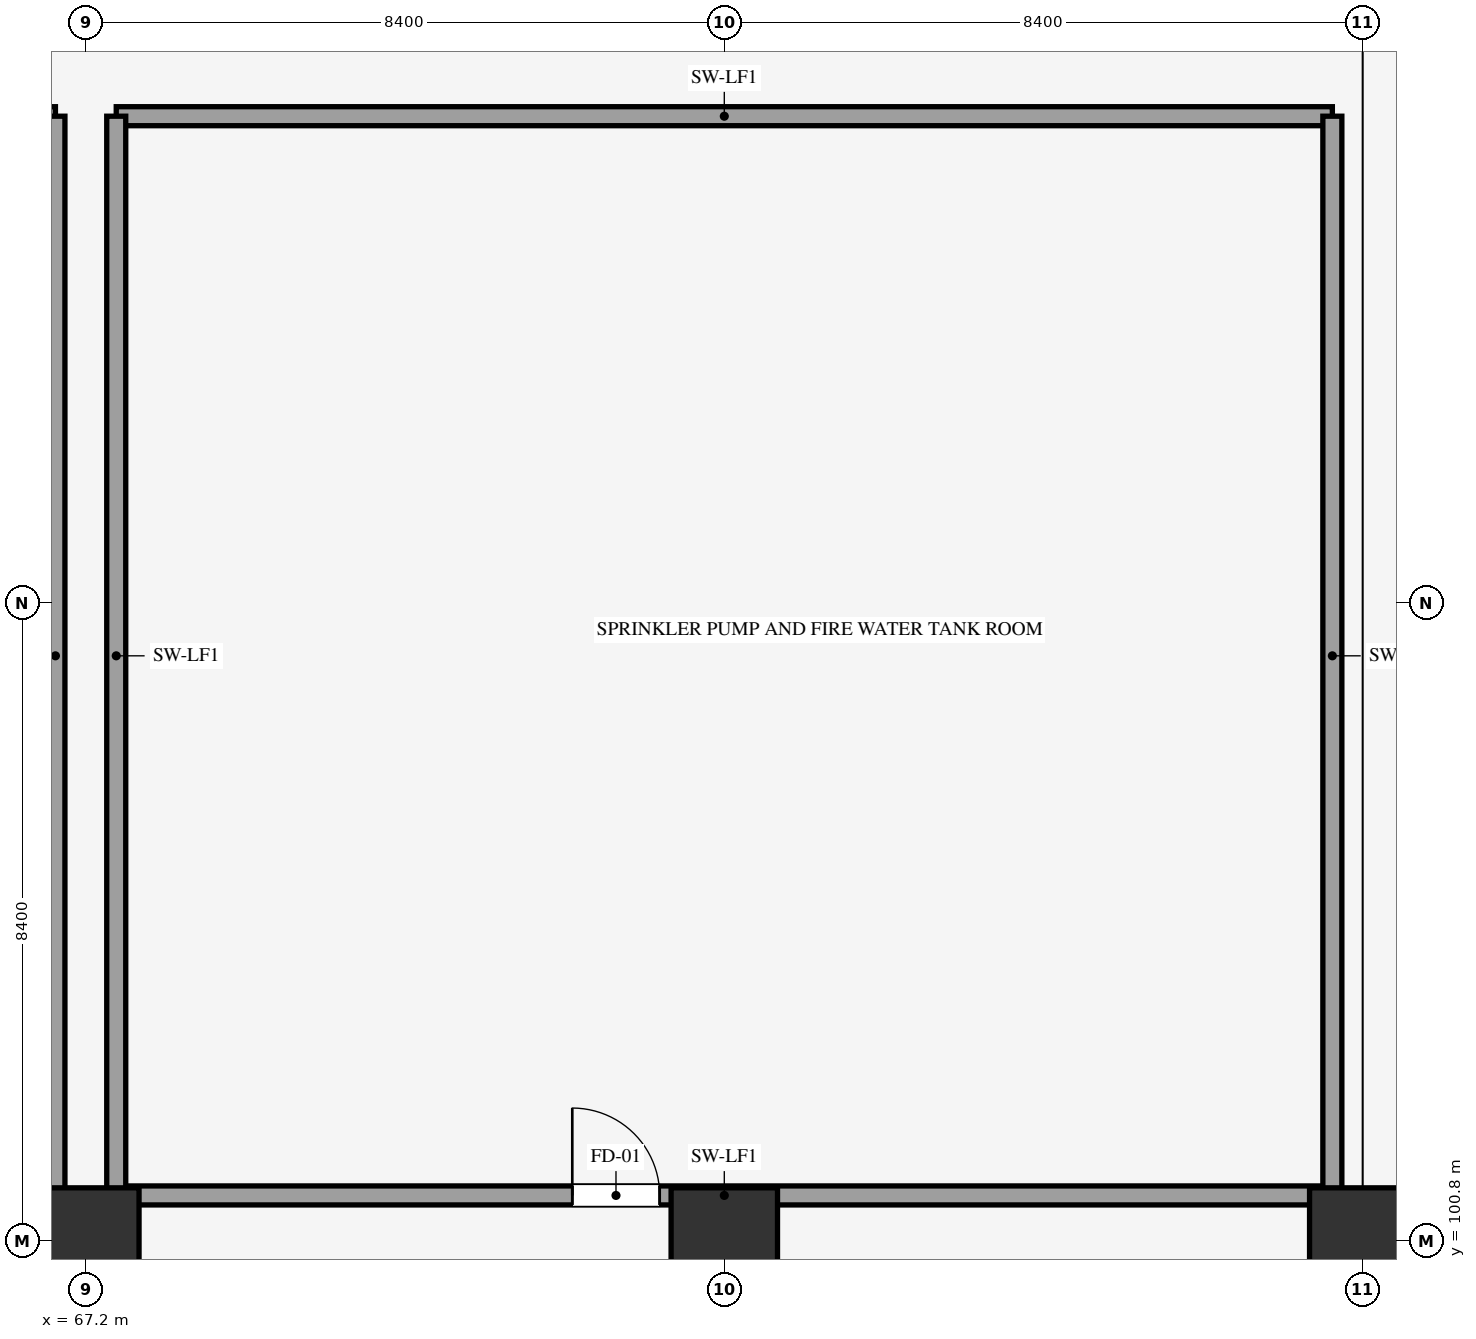
"""IFC4 building model, lengths in metres.
Left out: names, types, materials, properties, quantities, classifications, styles, units other than length and angle.
Written with IfcOpenShell. Run it as: python <this file> out.ifc"""

import sys

from ifc_helpers import new_model, si_unit, direction, frame, frame_2d, origin, origin_2d, place, context, subcontext, project, spatial, rectangle, extrude, element, fill, save


model = new_model("IFC4")
c1 = context("Model", 3, precision=1e-05, world=origin(), true_north=direction((0.0, 1.0)))
c2 = subcontext(c1, "Body", "Model", "MODEL_VIEW")
j1 = project(units=[si_unit("LENGTHUNIT", "METRE"), si_unit("PLANEANGLEUNIT", "RADIAN")], contexts=[c1])
p1 = place(None, origin())
s1 = spatial("IfcSite", under=j1, at=p1, CompositionType="ELEMENT")
p2 = place(p1, origin())
s2 = spatial("IfcBuilding", under=s1, at=p2, CompositionType="ELEMENT")
p3 = place(p2, frame((0.0, 0.0, -5.4)))
s3 = spatial("IfcBuildingStorey", under=s2, at=p3, CompositionType="ELEMENT", Elevation=-5.4)
for number, where, z_axis, x_axis in (
    (1, (67.2, 100.8, 0.0), (0.0, 0.0, 1.0), (1.0, 0.0, 0.0)),
    (2, (75.6, 100.8, 0.0), (0.0, 0.0, 1.0), (1.0, 0.0, 0.0)),
    (3, (84.0, 100.8, 0.0), (0.0, 0.0, 1.0), (1.0, 0.0, 0.0)),
):
    element("IfcColumn", number, at=place(p3, frame(where, z_axis=z_axis, x_axis=x_axis)), inside=s3, PredefinedType="COLUMN", context=c2, shape_type="SweptSolid", body=[
        extrude(rectangle(XDim=1.4, YDim=1.4, at=origin_2d()), origin(), (0.0, 0.0, 1.0), 5.4),
    ])
p4 = place(p3, frame((34.0, 101.4, 0.0), z_axis=(0.0, 0.0, 1.0), x_axis=(1.0, 0.0, 0.0)))
e4 = element("IfcWall", 4, at=p4, inside=s3, PredefinedType="SHEAR", context=c2, shape_type="SweptSolid", body=[
    extrude(rectangle(XDim=32.8, YDim=0.25, at=frame_2d((16.4, 0.0))), origin(), (0.0, 0.0, 1.0), 5.1),
])
p5 = place(p4, frame((8.75, 0.0, 0.0)))
e5 = element("IfcOpeningElement", 5, at=p5, cuts=e4, PredefinedType="OPENING", context=c2, shape_type="SweptSolid", body=[
    extrude(rectangle(XDim=1.15, YDim=2.15, at=frame_2d((0.575, 1.075))), frame((0.0, 0.135, 0.0), z_axis=(0.0, -1.0, 0.0), x_axis=(1.0, 0.0, 0.0)), (0.0, 0.0, 1.0), 0.27),
])
p6 = place(p4, frame((22.0, 0.0, 0.0)))
e6 = element("IfcOpeningElement", 6, at=p6, cuts=e4, PredefinedType="OPENING", context=c2, shape_type="SweptSolid", body=[
    extrude(rectangle(XDim=1.15, YDim=2.15, at=frame_2d((0.575, 1.075))), frame((0.0, 0.135, 0.0), z_axis=(0.0, -1.0, 0.0), x_axis=(1.0, 0.0, 0.0)), (0.0, 0.0, 1.0), 0.27),
])
p7 = place(p3, frame((34.0, 115.6, 0.0), z_axis=(0.0, 0.0, 1.0), x_axis=(1.0, 0.0, 0.0)))
e7 = element("IfcWall", 7, at=p7, inside=s3, PredefinedType="SHEAR", context=c2, shape_type="SweptSolid", body=[
    extrude(rectangle(XDim=32.8, YDim=0.25, at=frame_2d((16.4, 0.0))), origin(), (0.0, 0.0, 1.0), 5.1),
])
p8 = place(p3, frame((66.8, 101.4, 0.0), z_axis=(0.0, 0.0, 1.0), x_axis=(0.0, 1.0, 0.0)))
e8 = element("IfcWall", 8, at=p8, inside=s3, PredefinedType="SHEAR", context=c2, shape_type="SweptSolid", body=[
    extrude(rectangle(XDim=14.2, YDim=0.25, at=frame_2d((7.1, 0.0))), origin(), (0.0, 0.0, 1.0), 5.1),
])
p9 = place(p3, frame((67.6, 101.4, 0.0), z_axis=(0.0, 0.0, 1.0), x_axis=(1.0, 0.0, 0.0)))
e9 = element("IfcWall", 9, at=p9, inside=s3, PredefinedType="SHEAR", context=c2, shape_type="SweptSolid", body=[
    extrude(rectangle(XDim=16.0, YDim=0.25, at=frame_2d((8.0, 0.0))), origin(), (0.0, 0.0, 1.0), 5.1),
])
p10 = place(p9, frame((6.0, 0.0, 0.0)))
e10 = element("IfcOpeningElement", 10, at=p10, cuts=e9, PredefinedType="OPENING", context=c2, shape_type="SweptSolid", body=[
    extrude(rectangle(XDim=1.15, YDim=2.15, at=frame_2d((0.575, 1.075))), frame((0.0, 0.135, 0.0), z_axis=(0.0, -1.0, 0.0), x_axis=(1.0, 0.0, 0.0)), (0.0, 0.0, 1.0), 0.27),
])
p11 = place(p3, frame((67.6, 115.6, 0.0), z_axis=(0.0, 0.0, 1.0), x_axis=(1.0, 0.0, 0.0)))
e11 = element("IfcWall", 11, at=p11, inside=s3, PredefinedType="SHEAR", context=c2, shape_type="SweptSolid", body=[
    extrude(rectangle(XDim=16.0, YDim=0.25, at=frame_2d((8.0, 0.0))), origin(), (0.0, 0.0, 1.0), 5.1),
])
for number, where, z_axis, x_axis in (
    (12, (67.6, 101.4, 0.0), (0.0, 0.0, 1.0), (0.0, 1.0, 0.0)),
    (13, (83.6, 101.4, 0.0), (0.0, 0.0, 1.0), (0.0, 1.0, 0.0)),
):
    element("IfcWall", number, at=place(p3, frame(where, z_axis=z_axis, x_axis=x_axis)), inside=s3, PredefinedType="SHEAR", context=c2, shape_type="SweptSolid", body=[
        extrude(rectangle(XDim=14.2, YDim=0.25, at=frame_2d((7.1, 0.0))), origin(), (0.0, 0.0, 1.0), 5.1),
    ])
p12 = place(p10, origin())
e14 = element("IfcDoor", 14, at=p12, inside=s3, OperationType="SINGLE_SWING_LEFT", PredefinedType="DOOR", context=c2, shape_type="SweptSolid", body=[
    extrude(rectangle(XDim=1.15, YDim=2.15, at=frame_2d((0.575, 1.075))), frame((0.0, 0.025, 0.0), z_axis=(0.0, -1.0, 0.0), x_axis=(1.0, 0.0, 0.0)), (0.0, 0.0, 1.0), 0.05),
])
fill(e10, e14)
save(model, sys.argv[1])
